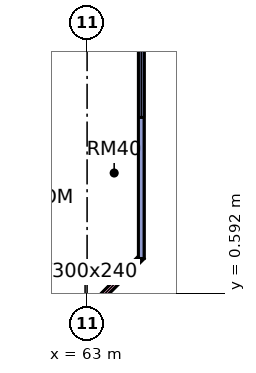
"""IFC4 building model, lengths in metres.
Left out: names, types, materials, properties, quantities, classifications, styles, units other than length and angle.
Written with IfcOpenShell. Run it as: python <this file> out.ifc"""

import sys

from ifc_helpers import new_model, si_unit, direction, frame, frame_2d, origin, place, context, subcontext, project, spatial, rectangle, extrude, element, fill, save


model = new_model("IFC4")
c1 = context("Model", 3, precision=1e-05, world=origin(), true_north=direction((0.0, 1.0)))
c2 = subcontext(c1, "Body", "Model", "MODEL_VIEW")
j1 = project(units=[si_unit("LENGTHUNIT", "METRE"), si_unit("PLANEANGLEUNIT", "RADIAN")], contexts=[c1])
p1 = place(None, origin())
s1 = spatial("IfcSite", under=j1, at=p1, CompositionType="ELEMENT")
p2 = place(p1, origin())
s2 = spatial("IfcBuilding", under=s1, at=p2, CompositionType="ELEMENT")
p3 = place(p2, frame((0.0, 0.0, 299.65)))
s3 = spatial("IfcBuildingStorey", under=s2, at=p3, CompositionType="ELEMENT", Elevation=299.65)
p4 = place(p3, frame((61.447, -1.447, 0.0), z_axis=(0.0, 0.0, 1.0), x_axis=(0.707106781187, 0.707106781187, 0.0)))
e1 = element("IfcWall", 1, at=p4, inside=s3, PredefinedType="SOLIDWALL", context=c2, shape_type="SweptSolid", body=[
    extrude(rectangle(XDim=4.243, YDim=0.15, at=frame_2d((2.121, 0.0))), origin(), (0.0, 0.0, 1.0), 3.35),
])
p5 = place(p4, frame((0.621, 0.0, 0.45)))
e2 = element("IfcOpeningElement", 2, at=p5, cuts=e1, PredefinedType="OPENING", context=c2, shape_type="SweptSolid", body=[
    extrude(rectangle(XDim=3.0, YDim=2.4, at=frame_2d((1.5, 1.2))), frame((0.0, 0.085, 0.0), z_axis=(0.0, -1.0, 0.0), x_axis=(1.0, 0.0, 0.0)), (0.0, 0.0, 1.0), 0.17),
])
p6 = place(p3, frame((64.425, 1.5, 0.0), z_axis=(0.0, 0.0, 1.0), x_axis=(0.0, 1.0, 0.0)))
e3 = element("IfcWall", 3, at=p6, inside=s3, PredefinedType="SOLIDWALL", context=c2, shape_type="SweptSolid", body=[
    extrude(rectangle(XDim=10.425, YDim=0.15, at=frame_2d((5.212, 0.0))), origin(), (0.0, 0.0, 1.0), 3.35),
])
p7 = place(p6, frame((3.712, 0.0, 0.45)))
e4 = element("IfcOpeningElement", 4, at=p7, cuts=e3, PredefinedType="OPENING", context=c2, shape_type="SweptSolid", body=[
    extrude(rectangle(XDim=3.0, YDim=2.4, at=frame_2d((1.5, 1.2))), frame((0.0, 0.085, 0.0), z_axis=(0.0, -1.0, 0.0), x_axis=(1.0, 0.0, 0.0)), (0.0, 0.0, 1.0), 0.17),
])
p8 = place(p5, origin())
e5 = element("IfcWindow", 5, at=p8, inside=s3, PartitioningType="SINGLE_PANEL", PredefinedType="WINDOW", context=c2, shape_type="SweptSolid", body=[
    extrude(rectangle(XDim=3.0, YDim=2.4, at=frame_2d((1.5, 1.2))), frame((0.0, 0.03, 0.0), z_axis=(0.0, -1.0, 0.0), x_axis=(1.0, 0.0, 0.0)), (0.0, 0.0, 1.0), 0.06),
])
fill(e2, e5)
p9 = place(p7, origin())
e6 = element("IfcWindow", 6, at=p9, inside=s3, PartitioningType="SINGLE_PANEL", PredefinedType="WINDOW", context=c2, shape_type="SweptSolid", body=[
    extrude(rectangle(XDim=3.0, YDim=2.4, at=frame_2d((1.5, 1.2))), frame((0.0, 0.03, 0.0), z_axis=(0.0, -1.0, 0.0), x_axis=(1.0, 0.0, 0.0)), (0.0, 0.0, 1.0), 0.06),
])
fill(e4, e6)
save(model, sys.argv[1])
